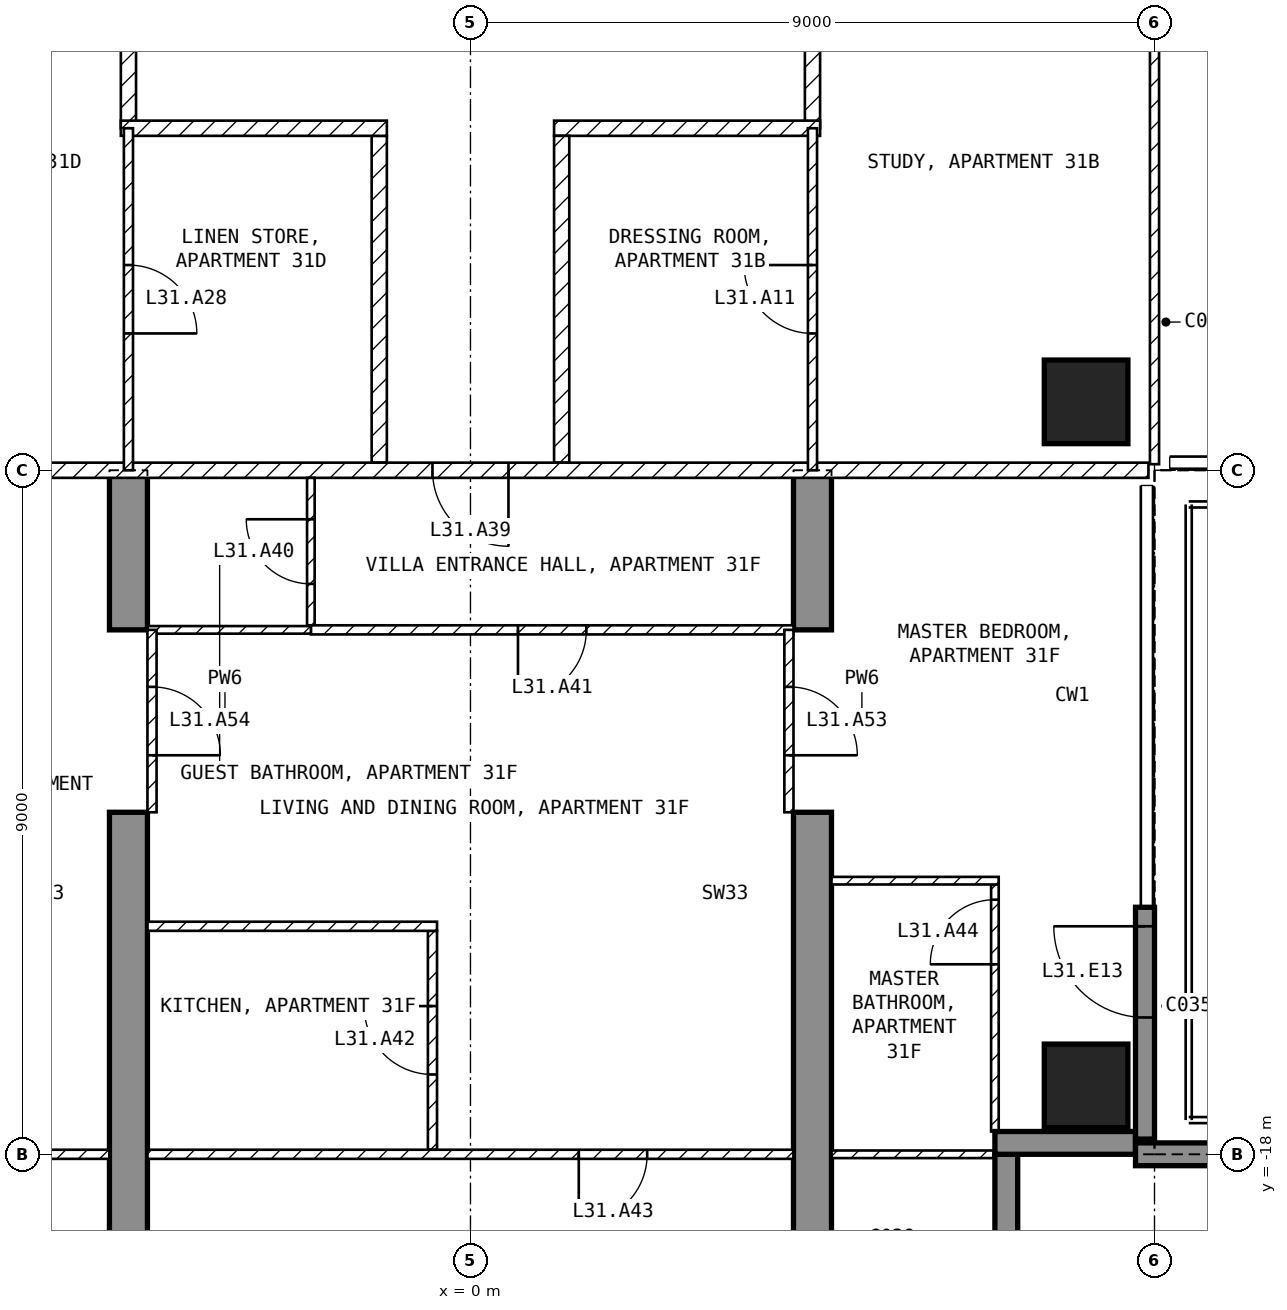
"""IFC4 building model, lengths in metres.
Left out: names, types, materials, properties, quantities, classifications, styles, units other than length and angle.
Written with IfcOpenShell. Run it as: python <this file> out.ifc"""

import sys

from ifc_helpers import new_model, si_unit, direction, frame, frame_2d, origin, origin_2d, place, context, subcontext, project, spatial, polyline, rectangle, outline, extrude, element, fill, save


model = new_model("IFC4")
c1 = context("Model", 3, precision=1e-05, world=origin(), true_north=direction((0.0, 1.0)))
c2 = subcontext(c1, "Body", "Model", "MODEL_VIEW")
j1 = project(units=[si_unit("LENGTHUNIT", "METRE"), si_unit("PLANEANGLEUNIT", "RADIAN")], contexts=[c1])
p1 = place(None, origin())
s1 = spatial("IfcSite", under=j1, at=p1, CompositionType="ELEMENT")
p2 = place(p1, origin())
s2 = spatial("IfcBuilding", under=s1, at=p2, CompositionType="ELEMENT")
p3 = place(p2, frame((0.0, 0.0, 130.4)))
s3 = spatial("IfcBuildingStorey", under=s2, at=p3, CompositionType="ELEMENT", Elevation=130.4)
for number, where, z_axis, x_axis in (
    (1, (8.1, -17.1, -0.25), (0.0, 0.0, 1.0), (1.0, 0.0, 0.0)),
    (2, (8.1, -8.1, -0.25), (0.0, 0.0, 1.0), (1.0, 0.0, 0.0)),
):
    element("IfcColumn", number, at=place(p3, frame(where, z_axis=z_axis, x_axis=x_axis)), inside=s3, PredefinedType="COLUMN", context=c2, shape_type="SweptSolid", body=[
        extrude(rectangle(XDim=1.1, YDim=1.1, at=origin_2d()), origin(), (0.0, 0.0, 1.0), 3.5),
    ])
for number, where, z_axis, x_axis in (
    (3, (-4.75, -20.15, -0.25), (1.0, 0.0, 0.0), (0.0, 1.0, 0.0)),
    (4, (4.25, -20.15, -0.25), (1.0, 0.0, 0.0), (0.0, 1.0, 0.0)),
):
    element("IfcWall", number, at=place(p3, frame(where, z_axis=z_axis, x_axis=x_axis)), inside=s3, PredefinedType="SHEAR", context=c2, shape_type="SweptSolid", body=[
        extrude(outline(polyline([(0.0, 0.0), (6.65, 0.0), (6.65, 2.65), (9.05, 2.65), (9.05, 0.0), (11.15, 0.0), (11.15, 3.5), (0.0, 3.5), (0.0, 0.0)])), origin(), (0.0, 0.0, 1.0), 0.5),
    ])
p4 = place(p3, frame((8.875, -17.8, 0.0), z_axis=(0.0, 0.0, 1.0), x_axis=(0.0, 1.0, 0.0)))
e5 = element("IfcWall", 5, at=p4, inside=s3, PredefinedType="SOLIDWALL", context=c2, shape_type="SweptSolid", body=[
    extrude(rectangle(XDim=3.05, YDim=0.25, at=frame_2d((1.525, 0.0))), origin(), (0.0, 0.0, 1.0), 3.25),
])
p5 = place(p4, frame((1.6, 0.0, 0.0)))
e6 = element("IfcOpeningElement", 6, at=p5, cuts=e5, PredefinedType="OPENING", context=c2, shape_type="SweptSolid", body=[
    extrude(rectangle(XDim=1.2, YDim=2.4, at=frame_2d((0.6, 1.2))), frame((0.0, 0.135, 0.0), z_axis=(0.0, -1.0, 0.0), x_axis=(1.0, 0.0, 0.0)), (0.0, 0.0, 1.0), 0.27),
])
p6 = place(p3, frame((7.05, -19.8, 0.0), z_axis=(0.0, 0.0, 1.0), x_axis=(0.0, 1.0, 0.0)))
e7 = element("IfcWall", 7, at=p6, inside=s3, PredefinedType="SOLIDWALL", context=c2, shape_type="SweptSolid", body=[
    extrude(rectangle(XDim=1.8, YDim=0.3, at=frame_2d((0.9, 0.0))), origin(), (0.0, 0.0, 1.0), 3.25),
])
p7 = place(p3, frame((6.9, -17.85, 0.0), z_axis=(0.0, 0.0, 1.0), x_axis=(1.0, 0.0, 0.0)))
e8 = element("IfcWall", 8, at=p7, inside=s3, PredefinedType="SOLIDWALL", context=c2, shape_type="SweptSolid", body=[
    extrude(rectangle(XDim=1.85, YDim=0.3, at=frame_2d((0.925, 0.0))), origin(), (0.0, 0.0, 1.0), 3.25),
])
p8 = place(p3, frame((8.75, -18.0, 0.0), z_axis=(0.0, 0.0, 1.0), x_axis=(1.0, 0.0, 0.0)))
e9 = element("IfcWall", 9, at=p8, inside=s3, PredefinedType="SOLIDWALL", context=c2, shape_type="SweptSolid", body=[
    extrude(rectangle(XDim=2.99, YDim=0.3, at=frame_2d((1.495, 0.0))), origin(), (0.0, 0.0, 1.0), 3.25),
])
p9 = place(p3, frame((4.5, -1.3, 0.0), z_axis=(0.0, 0.0, 1.0), x_axis=(0.0, -1.0, 0.0)))
e10 = element("IfcWall", 10, at=p9, inside=s3, PredefinedType="PARTITIONING", context=c2, shape_type="SweptSolid", body=[
    extrude(rectangle(XDim=3.2, YDim=0.2, at=frame_2d((1.6, 0.0))), origin(), (0.0, 0.0, 1.0), 3.25),
])
p10 = place(p3, frame((4.6, -4.5, 0.0), z_axis=(0.0, 0.0, 1.0), x_axis=(-1.0, 0.0, 0.0)))
e11 = element("IfcWall", 11, at=p10, inside=s3, PredefinedType="PARTITIONING", context=c2, shape_type="SweptSolid", body=[
    extrude(rectangle(XDim=3.5, YDim=0.2, at=frame_2d((1.75, 0.0))), origin(), (0.0, 0.0, 1.0), 3.25),
])
p11 = place(p3, frame((1.2, -4.6, 0.0), z_axis=(0.0, 0.0, 1.0), x_axis=(0.0, -1.0, 0.0)))
e12 = element("IfcWall", 12, at=p11, inside=s3, PredefinedType="PARTITIONING", context=c2, shape_type="SweptSolid", body=[
    extrude(rectangle(XDim=4.3, YDim=0.2, at=frame_2d((2.15, 0.0))), origin(), (0.0, 0.0, 1.0), 3.25),
])
p12 = place(p3, frame((-4.5, -4.5, 0.0), z_axis=(0.0, 0.0, 1.0), x_axis=(0.0, 1.0, 0.0)))
e13 = element("IfcWall", 13, at=p12, inside=s3, PredefinedType="PARTITIONING", context=c2, shape_type="SweptSolid", body=[
    extrude(rectangle(XDim=3.2, YDim=0.2, at=frame_2d((1.6, 0.0))), origin(), (0.0, 0.0, 1.0), 3.25),
])
p13 = place(p3, frame((-1.2, -8.9, 0.0), z_axis=(0.0, 0.0, 1.0), x_axis=(0.0, 1.0, 0.0)))
e14 = element("IfcWall", 14, at=p13, inside=s3, PredefinedType="PARTITIONING", context=c2, shape_type="SweptSolid", body=[
    extrude(rectangle(XDim=4.3, YDim=0.2, at=frame_2d((2.15, 0.0))), origin(), (0.0, 0.0, 1.0), 3.25),
])
p14 = place(p3, frame((-1.1, -4.5, 0.0), z_axis=(0.0, 0.0, 1.0), x_axis=(-1.0, 0.0, 0.0)))
e15 = element("IfcWall", 15, at=p14, inside=s3, PredefinedType="PARTITIONING", context=c2, shape_type="SweptSolid", body=[
    extrude(rectangle(XDim=3.5, YDim=0.2, at=frame_2d((1.75, 0.0))), origin(), (0.0, 0.0, 1.0), 3.25),
])
p15 = place(p3, frame((8.92, -9.0, 0.0), z_axis=(0.0, 0.0, 1.0), x_axis=(-1.0, 0.0, 0.0)))
e16 = element("IfcWall", 16, at=p15, inside=s3, PredefinedType="PARTITIONING", context=c2, shape_type="SweptSolid", body=[
    extrude(rectangle(XDim=17.84, YDim=0.2, at=frame_2d((8.92, 0.0))), origin(), (0.0, 0.0, 1.0), 3.25),
])
p16 = place(p15, frame((8.42, 0.0, 0.0)))
e17 = element("IfcOpeningElement", 17, at=p16, cuts=e16, PredefinedType="OPENING", context=c2, shape_type="SweptSolid", body=[
    extrude(rectangle(XDim=1.0, YDim=2.1, at=frame_2d((0.5, 1.05))), frame((0.0, 0.11, 0.0), z_axis=(0.0, -1.0, 0.0), x_axis=(1.0, 0.0, 0.0)), (0.0, 0.0, 1.0), 0.22),
])
p17 = place(p3, frame((9.0, -8.92, 0.0), z_axis=(0.0, 0.0, 1.0), x_axis=(0.0, 1.0, 0.0)))
e18 = element("IfcWall", 18, at=p17, inside=s3, PredefinedType="PARTITIONING", context=c2, shape_type="SweptSolid", body=[
    extrude(rectangle(XDim=7.62, YDim=0.12, at=frame_2d((3.81, 0.0))), origin(), (0.0, 0.0, 1.0), 3.25),
])
p18 = place(p17, frame((6.32, 0.0, 0.0)))
e19 = element("IfcOpeningElement", 19, at=p18, cuts=e18, PredefinedType="OPENING", context=c2, shape_type="SweptSolid", body=[
    extrude(rectangle(XDim=0.9, YDim=2.1, at=frame_2d((0.45, 1.05))), frame((0.0, 0.07, 0.0), z_axis=(0.0, -1.0, 0.0), x_axis=(1.0, 0.0, 0.0)), (0.0, 0.0, 1.0), 0.14),
])
p19 = place(p3, frame((4.5, -9.0, 0.0), z_axis=(0.0, 0.0, 1.0), x_axis=(0.0, 1.0, 0.0)))
e20 = element("IfcWall", 20, at=p19, inside=s3, PredefinedType="PARTITIONING", context=c2, shape_type="SweptSolid", body=[
    extrude(rectangle(XDim=4.5, YDim=0.12, at=frame_2d((2.25, 0.0))), origin(), (0.0, 0.0, 1.0), 3.25),
])
p20 = place(p19, frame((1.8, 0.0, 0.0)))
e21 = element("IfcOpeningElement", 21, at=p20, cuts=e20, PredefinedType="OPENING", context=c2, shape_type="SweptSolid", body=[
    extrude(rectangle(XDim=0.9, YDim=2.1, at=frame_2d((0.45, 1.05))), frame((0.0, 0.07, 0.0), z_axis=(0.0, -1.0, 0.0), x_axis=(1.0, 0.0, 0.0)), (0.0, 0.0, 1.0), 0.14),
])
p21 = place(p3, frame((-4.5, -4.5, 0.0), z_axis=(0.0, 0.0, 1.0), x_axis=(0.0, -1.0, 0.0)))
e22 = element("IfcWall", 22, at=p21, inside=s3, PredefinedType="PARTITIONING", context=c2, shape_type="SweptSolid", body=[
    extrude(rectangle(XDim=4.5, YDim=0.12, at=frame_2d((2.25, 0.0))), origin(), (0.0, 0.0, 1.0), 3.25),
])
p22 = place(p21, frame((1.8, 0.0, 0.0)))
e23 = element("IfcOpeningElement", 23, at=p22, cuts=e22, PredefinedType="OPENING", context=c2, shape_type="SweptSolid", body=[
    extrude(rectangle(XDim=0.9, YDim=2.1, at=frame_2d((0.45, 1.05))), frame((0.0, 0.07, 0.0), z_axis=(0.0, -1.0, 0.0), x_axis=(1.0, 0.0, 0.0)), (0.0, 0.0, 1.0), 0.14),
])
p23 = place(p3, frame((-2.1, -11.04, 0.0), z_axis=(0.0, 0.0, 1.0), x_axis=(0.0, 1.0, 0.0)))
e24 = element("IfcWall", 24, at=p23, inside=s3, PredefinedType="PARTITIONING", context=c2, shape_type="SweptSolid", body=[
    extrude(rectangle(XDim=1.94, YDim=0.1, at=frame_2d((0.97, 0.0))), origin(), (0.0, 0.0, 1.0), 3.25),
])
p24 = place(p23, frame((0.545, 0.0, 0.0)))
e25 = element("IfcOpeningElement", 25, at=p24, cuts=e24, PredefinedType="OPENING", context=c2, shape_type="SweptSolid", body=[
    extrude(rectangle(XDim=0.85, YDim=2.1, at=frame_2d((0.425, 1.05))), frame((0.0, 0.06, 0.0), z_axis=(0.0, -1.0, 0.0), x_axis=(1.0, 0.0, 0.0)), (0.0, 0.0, 1.0), 0.12),
])
p25 = place(p3, frame((4.25, -11.1, 0.0), z_axis=(0.0, 0.0, 1.0), x_axis=(-1.0, 0.0, 0.0)))
e26 = element("IfcWall", 26, at=p25, inside=s3, PredefinedType="PARTITIONING", context=c2, shape_type="SweptSolid", body=[
    extrude(rectangle(XDim=6.35, YDim=0.12, at=frame_2d((3.175, 0.0))), origin(), (0.0, 0.0, 1.0), 3.25),
])
p26 = place(p25, frame((2.725, 0.0, 0.0)))
e27 = element("IfcOpeningElement", 27, at=p26, cuts=e26, PredefinedType="OPENING", context=c2, shape_type="SweptSolid", body=[
    extrude(rectangle(XDim=0.9, YDim=2.1, at=frame_2d((0.45, 1.05))), frame((0.0, 0.07, 0.0), z_axis=(0.0, -1.0, 0.0), x_axis=(1.0, 0.0, 0.0)), (0.0, 0.0, 1.0), 0.14),
])
p27 = place(p3, frame((-2.1, -11.1, 0.0), z_axis=(0.0, 0.0, 1.0), x_axis=(-1.0, 0.0, 0.0)))
e28 = element("IfcWall", 28, at=p27, inside=s3, PredefinedType="PARTITIONING", context=c2, shape_type="SweptSolid", body=[
    extrude(rectangle(XDim=2.15, YDim=0.1, at=frame_2d((1.075, 0.0))), origin(), (0.0, 0.0, 1.0), 3.25),
])
p28 = place(p3, frame((-0.5, -17.94, 0.0), z_axis=(0.0, 0.0, 1.0), x_axis=(0.0, 1.0, 0.0)))
e29 = element("IfcWall", 29, at=p28, inside=s3, PredefinedType="PARTITIONING", context=c2, shape_type="SweptSolid", body=[
    extrude(rectangle(XDim=2.88, YDim=0.12, at=frame_2d((1.44, 0.0))), origin(), (0.0, 0.0, 1.0), 3.25),
])
p29 = place(p28, frame((0.99, 0.0, 0.0)))
e30 = element("IfcOpeningElement", 30, at=p29, cuts=e29, PredefinedType="OPENING", context=c2, shape_type="SweptSolid", body=[
    extrude(rectangle(XDim=0.9, YDim=2.1, at=frame_2d((0.45, 1.05))), frame((0.0, 0.07, 0.0), z_axis=(0.0, -1.0, 0.0), x_axis=(1.0, 0.0, 0.0)), (0.0, 0.0, 1.0), 0.14),
])
p30 = place(p3, frame((-0.44, -15.0, 0.0), z_axis=(0.0, 0.0, 1.0), x_axis=(-1.0, 0.0, 0.0)))
e31 = element("IfcWall", 31, at=p30, inside=s3, PredefinedType="PARTITIONING", context=c2, shape_type="SweptSolid", body=[
    extrude(rectangle(XDim=3.81, YDim=0.12, at=frame_2d((1.905, 0.0))), origin(), (0.0, 0.0, 1.0), 3.25),
])
p31 = place(p3, frame((4.25, -18.0, 0.0), z_axis=(0.0, 0.0, 1.0), x_axis=(-1.0, 0.0, 0.0)))
e32 = element("IfcWall", 32, at=p31, inside=s3, PredefinedType="PARTITIONING", context=c2, shape_type="SweptSolid", body=[
    extrude(rectangle(XDim=8.5, YDim=0.12, at=frame_2d((4.25, 0.0))), origin(), (0.0, 0.0, 1.0), 3.25),
])
p32 = place(p31, frame((1.925, 0.0, 0.0)))
e33 = element("IfcOpeningElement", 33, at=p32, cuts=e32, PredefinedType="OPENING", context=c2, shape_type="SweptSolid", body=[
    extrude(rectangle(XDim=0.9, YDim=2.1, at=frame_2d((0.45, 1.05))), frame((0.0, 0.07, 0.0), z_axis=(0.0, -1.0, 0.0), x_axis=(1.0, 0.0, 0.0)), (0.0, 0.0, 1.0), 0.14),
])
p33 = place(p3, frame((6.9, -17.7, 0.0), z_axis=(0.0, 0.0, 1.0), x_axis=(0.0, 1.0, 0.0)))
e34 = element("IfcWall", 34, at=p33, inside=s3, PredefinedType="PARTITIONING", context=c2, shape_type="SweptSolid", body=[
    extrude(rectangle(XDim=3.25, YDim=0.1, at=frame_2d((1.625, 0.0))), origin(), (0.0, 0.0, 1.0), 3.25),
])
p34 = place(p33, frame((2.2, 0.0, 0.0)))
e35 = element("IfcOpeningElement", 35, at=p34, cuts=e34, PredefinedType="OPENING", context=c2, shape_type="SweptSolid", body=[
    extrude(rectangle(XDim=0.85, YDim=2.1, at=frame_2d((0.425, 1.05))), frame((0.0, 0.06, 0.0), z_axis=(0.0, -1.0, 0.0), x_axis=(1.0, 0.0, 0.0)), (0.0, 0.0, 1.0), 0.12),
])
p35 = place(p3, frame((6.95, -14.4, 0.0), z_axis=(0.0, 0.0, 1.0), x_axis=(-1.0, 0.0, 0.0)))
e36 = element("IfcWall", 36, at=p35, inside=s3, PredefinedType="PARTITIONING", context=c2, shape_type="SweptSolid", body=[
    extrude(rectangle(XDim=2.2, YDim=0.1, at=frame_2d((1.1, 0.0))), origin(), (0.0, 0.0, 1.0), 3.25),
])
p36 = place(p3, frame((7.12, -18.0, 0.0), z_axis=(0.0, 0.0, 1.0), x_axis=(-1.0, 0.0, 0.0)))
e37 = element("IfcWall", 37, at=p36, inside=s3, PredefinedType="PARTITIONING", context=c2, shape_type="SweptSolid", body=[
    extrude(rectangle(XDim=2.37, YDim=0.1, at=frame_2d((1.185, 0.0))), origin(), (0.0, 0.0, 1.0), 3.25),
])
p37 = place(p3, frame((-4.75, -18.0, 0.0), z_axis=(0.0, 0.0, 1.0), x_axis=(-1.0, 0.0, 0.0)))
e38 = element("IfcWall", 38, at=p37, inside=s3, PredefinedType="PARTITIONING", context=c2, shape_type="SweptSolid", body=[
    extrude(rectangle(XDim=2.37, YDim=0.12, at=frame_2d((1.185, 0.0))), origin(), (0.0, 0.0, 1.0), 3.25),
])
p38 = place(p3, frame((4.19, -11.1, 0.0), z_axis=(0.0, 0.0, 1.0), x_axis=(0.0, -1.0, 0.0)))
e39 = element("IfcWall", 39, at=p38, inside=s3, PredefinedType="PARTITIONING", context=c2, shape_type="SweptSolid", body=[
    extrude(rectangle(XDim=2.4, YDim=0.12, at=frame_2d((1.2, 0.0))), origin(), (0.0, 0.0, 1.0), 2.4),
])
p39 = place(p38, frame((0.75, 0.0, 0.0)))
e40 = element("IfcOpeningElement", 40, at=p39, cuts=e39, PredefinedType="OPENING", context=c2, shape_type="SweptSolid", body=[
    extrude(rectangle(XDim=0.9, YDim=2.1, at=frame_2d((0.45, 1.05))), frame((0.0, 0.07, 0.0), z_axis=(0.0, -1.0, 0.0), x_axis=(1.0, 0.0, 0.0)), (0.0, 0.0, 1.0), 0.14),
])
p40 = place(p3, frame((-4.19, -11.1, 0.0), z_axis=(0.0, 0.0, 1.0), x_axis=(0.0, -1.0, 0.0)))
e41 = element("IfcWall", 41, at=p40, inside=s3, PredefinedType="PARTITIONING", context=c2, shape_type="SweptSolid", body=[
    extrude(rectangle(XDim=2.4, YDim=0.12, at=frame_2d((1.2, 0.0))), origin(), (0.0, 0.0, 1.0), 2.4),
])
p41 = place(p40, frame((0.75, 0.0, 0.0)))
e42 = element("IfcOpeningElement", 42, at=p41, cuts=e41, PredefinedType="OPENING", context=c2, shape_type="SweptSolid", body=[
    extrude(rectangle(XDim=0.9, YDim=2.1, at=frame_2d((0.45, 1.05))), frame((0.0, 0.07, 0.0), z_axis=(0.0, -1.0, 0.0), x_axis=(1.0, 0.0, 0.0)), (0.0, 0.0, 1.0), 0.14),
])
p42 = place(p5, origin())
e43 = element("IfcDoor", 43, at=p42, inside=s3, OperationType="SINGLE_SWING_RIGHT", PredefinedType="DOOR", context=c2, shape_type="SweptSolid", body=[
    extrude(rectangle(XDim=1.2, YDim=2.4, at=frame_2d((0.6, 1.2))), frame((0.0, 0.025, 0.0), z_axis=(0.0, -1.0, 0.0), x_axis=(1.0, 0.0, 0.0)), (0.0, 0.0, 1.0), 0.05),
])
fill(e6, e43)
p43 = place(p20, origin())
e44 = element("IfcDoor", 44, at=p43, inside=s3, OperationType="SINGLE_SWING_RIGHT", PredefinedType="DOOR", context=c2, shape_type="SweptSolid", body=[
    extrude(rectangle(XDim=0.9, YDim=2.1, at=frame_2d((0.45, 1.05))), frame((0.0, 0.025, 0.0), z_axis=(0.0, -1.0, 0.0), x_axis=(1.0, 0.0, 0.0)), (0.0, 0.0, 1.0), 0.05),
])
fill(e21, e44)
p44 = place(p22, origin())
e45 = element("IfcDoor", 45, at=p44, inside=s3, OperationType="SINGLE_SWING_RIGHT", PredefinedType="DOOR", context=c2, shape_type="SweptSolid", body=[
    extrude(rectangle(XDim=0.9, YDim=2.1, at=frame_2d((0.45, 1.05))), frame((0.0, 0.025, 0.0), z_axis=(0.0, -1.0, 0.0), x_axis=(1.0, 0.0, 0.0)), (0.0, 0.0, 1.0), 0.05),
])
fill(e23, e45)
p45 = place(p16, origin())
e46 = element("IfcDoor", 46, at=p45, inside=s3, OperationType="SINGLE_SWING_LEFT", PredefinedType="DOOR", context=c2, shape_type="SweptSolid", body=[
    extrude(rectangle(XDim=1.0, YDim=2.1, at=frame_2d((0.5, 1.05))), frame((0.0, 0.025, 0.0), z_axis=(0.0, -1.0, 0.0), x_axis=(1.0, 0.0, 0.0)), (0.0, 0.0, 1.0), 0.05),
])
fill(e17, e46)
p46 = place(p24, origin())
e47 = element("IfcDoor", 47, at=p46, inside=s3, OperationType="SINGLE_SWING_RIGHT", PredefinedType="DOOR", context=c2, shape_type="SweptSolid", body=[
    extrude(rectangle(XDim=0.85, YDim=2.1, at=frame_2d((0.425, 1.05))), frame((0.0, 0.025, 0.0), z_axis=(0.0, -1.0, 0.0), x_axis=(1.0, 0.0, 0.0)), (0.0, 0.0, 1.0), 0.05),
])
fill(e25, e47)
p47 = place(p26, origin())
e48 = element("IfcDoor", 48, at=p47, inside=s3, OperationType="SINGLE_SWING_RIGHT", PredefinedType="DOOR", context=c2, shape_type="SweptSolid", body=[
    extrude(rectangle(XDim=0.9, YDim=2.1, at=frame_2d((0.45, 1.05))), frame((0.0, 0.025, 0.0), z_axis=(0.0, -1.0, 0.0), x_axis=(1.0, 0.0, 0.0)), (0.0, 0.0, 1.0), 0.05),
])
fill(e27, e48)
p48 = place(p29, origin())
e49 = element("IfcDoor", 49, at=p48, inside=s3, OperationType="SINGLE_SWING_RIGHT", PredefinedType="DOOR", context=c2, shape_type="SweptSolid", body=[
    extrude(rectangle(XDim=0.9, YDim=2.1, at=frame_2d((0.45, 1.05))), frame((0.0, 0.025, 0.0), z_axis=(0.0, -1.0, 0.0), x_axis=(1.0, 0.0, 0.0)), (0.0, 0.0, 1.0), 0.05),
])
fill(e30, e49)
p49 = place(p32, origin())
e50 = element("IfcDoor", 50, at=p49, inside=s3, OperationType="SINGLE_SWING_RIGHT", PredefinedType="DOOR", context=c2, shape_type="SweptSolid", body=[
    extrude(rectangle(XDim=0.9, YDim=2.1, at=frame_2d((0.45, 1.05))), frame((0.0, 0.025, 0.0), z_axis=(0.0, -1.0, 0.0), x_axis=(1.0, 0.0, 0.0)), (0.0, 0.0, 1.0), 0.05),
])
fill(e33, e50)
p50 = place(p34, origin())
e51 = element("IfcDoor", 51, at=p50, inside=s3, OperationType="SINGLE_SWING_LEFT", PredefinedType="DOOR", context=c2, shape_type="SweptSolid", body=[
    extrude(rectangle(XDim=0.85, YDim=2.1, at=frame_2d((0.425, 1.05))), frame((0.0, 0.025, 0.0), z_axis=(0.0, -1.0, 0.0), x_axis=(1.0, 0.0, 0.0)), (0.0, 0.0, 1.0), 0.05),
])
fill(e35, e51)
p51 = place(p39, origin())
e52 = element("IfcDoor", 52, at=p51, inside=s3, OperationType="SINGLE_SWING_RIGHT", PredefinedType="DOOR", context=c2, shape_type="SweptSolid", body=[
    extrude(rectangle(XDim=0.9, YDim=2.1, at=frame_2d((0.45, 1.05))), frame((0.0, 0.025, 0.0), z_axis=(0.0, -1.0, 0.0), x_axis=(1.0, 0.0, 0.0)), (0.0, 0.0, 1.0), 0.05),
])
fill(e40, e52)
p52 = place(p41, origin())
e53 = element("IfcDoor", 53, at=p52, inside=s3, OperationType="SINGLE_SWING_RIGHT", PredefinedType="DOOR", context=c2, shape_type="SweptSolid", body=[
    extrude(rectangle(XDim=0.9, YDim=2.1, at=frame_2d((0.45, 1.05))), frame((0.0, 0.025, 0.0), z_axis=(0.0, -1.0, 0.0), x_axis=(1.0, 0.0, 0.0)), (0.0, 0.0, 1.0), 0.05),
])
fill(e42, e53)
save(model, sys.argv[1])
